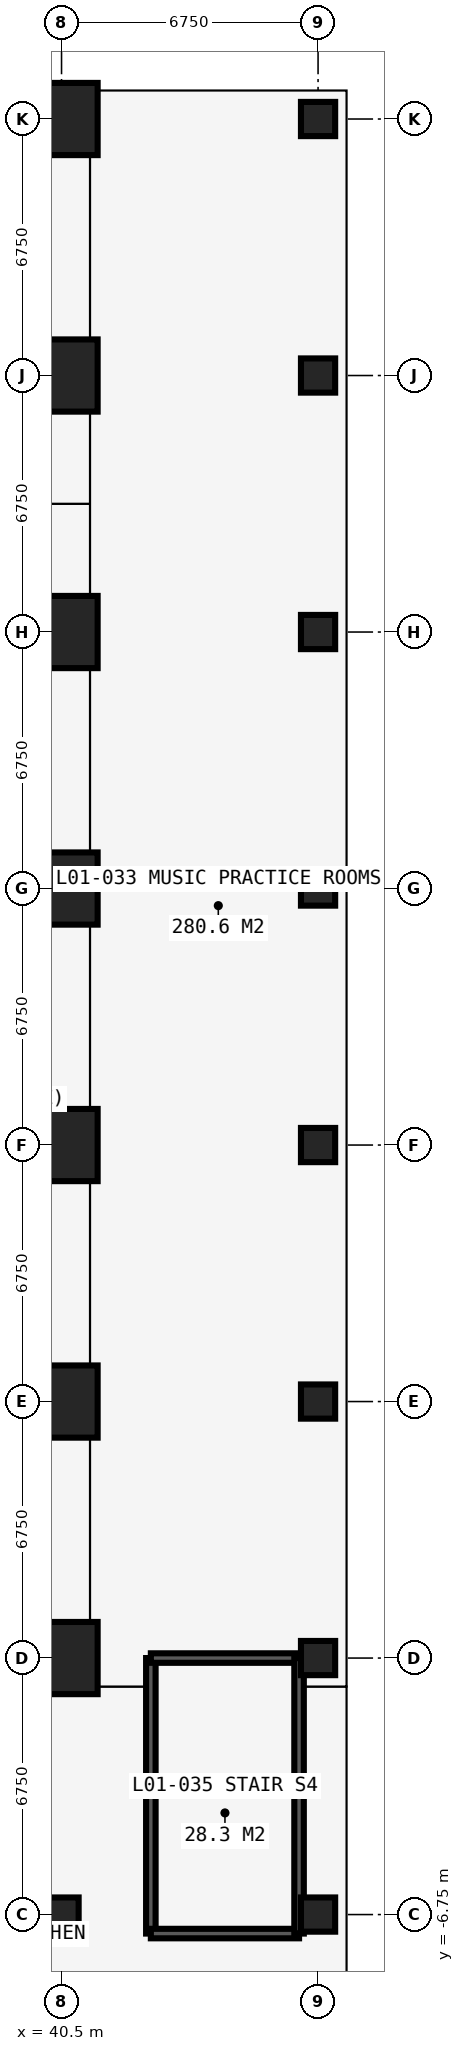
"""IFC4 building model, lengths in metres.
Left out: names, types, materials, properties, quantities, classifications, styles, units other than length and angle.
Written with IfcOpenShell. Run it as: python <this file> out.ifc"""

import sys

from ifc_helpers import new_model, si_unit, direction, frame, frame_2d, origin, origin_2d, place, context, subcontext, project, spatial, rectangle, circle, extrude, element, fill, save


model = new_model("IFC4")
c1 = context("Model", 3, precision=1e-05, world=origin(), true_north=direction((0.0, 1.0)))
c2 = subcontext(c1, "Body", "Model", "MODEL_VIEW")
j1 = project(units=[si_unit("LENGTHUNIT", "METRE"), si_unit("PLANEANGLEUNIT", "RADIAN")], contexts=[c1])
p1 = place(None, origin())
s1 = spatial("IfcSite", under=j1, at=p1, CompositionType="ELEMENT")
p2 = place(p1, origin())
s2 = spatial("IfcBuilding", under=s1, at=p2, CompositionType="ELEMENT")
p3 = place(p2, frame((0.0, 0.0, 4.5)))
s3 = spatial("IfcBuildingStorey", under=s2, at=p3, CompositionType="ELEMENT", Elevation=4.5)
p4 = place(p3, frame((40.5, -6.75, 0.0), z_axis=(0.0, 0.0, 1.0), x_axis=(1.0, 0.0, 0.0)))
e1 = element("IfcColumn", 1, at=p4, inside=s3, PredefinedType="COLUMN", context=c2, shape_type="SweptSolid", body=[
    extrude(circle(Radius=0.45, at=origin_2d()), origin(), (0.0, 0.0, 1.0), 4.5),
])
for number, where, z_axis, x_axis in (
    (2, (40.5, 0.0, 0.0), (0.0, 0.0, 1.0), (1.0, 0.0, 0.0)),
    (3, (40.5, 6.75, 0.0), (0.0, 0.0, 1.0), (1.0, 0.0, 0.0)),
    (4, (40.5, 13.5, 0.0), (0.0, 0.0, 1.0), (1.0, 0.0, 0.0)),
    (5, (40.5, 20.25, 0.0), (0.0, 0.0, 1.0), (1.0, 0.0, 0.0)),
    (6, (40.5, 27.0, 0.0), (0.0, 0.0, 1.0), (1.0, 0.0, 0.0)),
    (7, (40.5, 33.75, 0.0), (0.0, 0.0, 1.0), (1.0, 0.0, 0.0)),
    (8, (40.5, 40.5, 0.0), (0.0, 0.0, 1.0), (1.0, 0.0, 0.0)),
):
    element("IfcColumn", number, at=place(p3, frame(where, z_axis=z_axis, x_axis=x_axis)), inside=s3, PredefinedType="COLUMN", context=c2, shape_type="SweptSolid", body=[
        extrude(rectangle(XDim=1.9, YDim=1.9, at=origin_2d()), origin(), (0.0, 0.0, 1.0), 4.5),
    ])
for number, where, z_axis, x_axis in (
    (9, (47.25, -6.75, 0.0), (0.0, 0.0, 1.0), (1.0, 0.0, 0.0)),
    (10, (47.25, 0.0, 0.0), (0.0, 0.0, 1.0), (1.0, 0.0, 0.0)),
    (11, (47.25, 6.75, 0.0), (0.0, 0.0, 1.0), (1.0, 0.0, 0.0)),
    (12, (47.25, 13.5, 0.0), (0.0, 0.0, 1.0), (1.0, 0.0, 0.0)),
    (13, (47.25, 20.25, 0.0), (0.0, 0.0, 1.0), (1.0, 0.0, 0.0)),
    (14, (47.25, 27.0, 0.0), (0.0, 0.0, 1.0), (1.0, 0.0, 0.0)),
    (15, (47.25, 33.75, 0.0), (0.0, 0.0, 1.0), (1.0, 0.0, 0.0)),
    (16, (47.25, 40.5, 0.0), (0.0, 0.0, 1.0), (1.0, 0.0, 0.0)),
):
    element("IfcColumn", number, at=place(p3, frame(where, z_axis=z_axis, x_axis=x_axis)), inside=s3, PredefinedType="COLUMN", context=c2, shape_type="SweptSolid", body=[
        extrude(circle(Radius=0.45, at=origin_2d()), origin(), (0.0, 0.0, 1.0), 4.5),
    ])
p5 = place(p3, frame((-7.484, -0.75, 0.0), z_axis=(0.0, 0.0, 1.0), x_axis=(1.0, 0.0, 0.0)))
e17 = element("IfcWall", 17, at=p5, inside=s3, PredefinedType="PARTITIONING", context=c2, shape_type="SweptSolid", body=[
    extrude(rectangle(XDim=50.334, YDim=0.15, at=frame_2d((25.167, 0.0))), origin(), (0.0, 0.0, 1.0), 4.25),
])
p6 = place(p5, frame((18.384, 0.0, 0.0)))
e18 = element("IfcOpeningElement", 18, at=p6, cuts=e17, PredefinedType="OPENING", context=c2, shape_type="SweptSolid", body=[
    extrude(rectangle(XDim=1.6, YDim=2.4, at=frame_2d((0.8, 1.2))), frame((0.0, 0.085, 0.0), z_axis=(0.0, -1.0, 0.0), x_axis=(1.0, 0.0, 0.0)), (0.0, 0.0, 1.0), 0.17),
])
p7 = place(p5, frame((35.484, 0.0, 0.0)))
e19 = element("IfcOpeningElement", 19, at=p7, cuts=e17, PredefinedType="OPENING", context=c2, shape_type="SweptSolid", body=[
    extrude(rectangle(XDim=1.6, YDim=2.4, at=frame_2d((0.8, 1.2))), frame((0.0, 0.085, 0.0), z_axis=(0.0, -1.0, 0.0), x_axis=(1.0, 0.0, 0.0)), (0.0, 0.0, 1.0), 0.17),
])
p8 = place(p3, frame((30.375, 30.375, 0.0), z_axis=(0.0, 0.0, 1.0), x_axis=(1.0, 0.0, 0.0)))
e20 = element("IfcWall", 20, at=p8, inside=s3, PredefinedType="PARTITIONING", context=c2, shape_type="SweptSolid", body=[
    extrude(rectangle(XDim=10.875, YDim=0.15, at=frame_2d((5.438, 0.0))), origin(), (0.0, 0.0, 1.0), 4.25),
])
p9 = place(p3, frame((41.25, -0.75, 0.0), z_axis=(0.0, 0.0, 1.0), x_axis=(0.0, 1.0, 0.0)))
e21 = element("IfcWall", 21, at=p9, inside=s3, PredefinedType="PARTITIONING", context=c2, shape_type="SweptSolid", body=[
    extrude(rectangle(XDim=41.984, YDim=0.15, at=frame_2d((20.992, 0.0))), origin(), (0.0, 0.0, 1.0), 4.25),
])
p10 = place(p9, frame((15.2, 0.0, 0.0)))
e22 = element("IfcOpeningElement", 22, at=p10, cuts=e21, PredefinedType="OPENING", context=c2, shape_type="SweptSolid", body=[
    extrude(rectangle(XDim=1.6, YDim=2.4, at=frame_2d((0.8, 1.2))), frame((0.0, 0.085, 0.0), z_axis=(0.0, -1.0, 0.0), x_axis=(1.0, 0.0, 0.0)), (0.0, 0.0, 1.0), 0.17),
])
p11 = place(p3, frame((42.85, -7.25, 0.0), z_axis=(0.0, 0.0, 1.0), x_axis=(0.0, 1.0, 0.0)))
e23 = element("IfcWall", 23, at=p11, inside=s3, PredefinedType="SOLIDWALL", context=c2, shape_type="SweptSolid", body=[
    extrude(rectangle(XDim=7.25, YDim=0.25, at=frame_2d((3.625, 0.0))), origin(), (0.0, 0.0, 1.0), 4.25),
])
p12 = place(p3, frame((42.85, -7.25, 0.0), z_axis=(0.0, 0.0, 1.0), x_axis=(1.0, 0.0, 0.0)))
e24 = element("IfcWall", 24, at=p12, inside=s3, PredefinedType="SOLIDWALL", context=c2, shape_type="SweptSolid", body=[
    extrude(rectangle(XDim=3.9, YDim=0.25, at=frame_2d((1.95, 0.0))), origin(), (0.0, 0.0, 1.0), 4.25),
])
p13 = place(p12, frame((1.35, 0.0, 0.0)))
e25 = element("IfcOpeningElement", 25, at=p13, cuts=e24, PredefinedType="OPENING", context=c2, shape_type="SweptSolid", body=[
    extrude(rectangle(XDim=1.2, YDim=2.2, at=frame_2d((0.6, 1.1))), frame((0.0, 0.135, 0.0), z_axis=(0.0, -1.0, 0.0), x_axis=(1.0, 0.0, 0.0)), (0.0, 0.0, 1.0), 0.27),
])
p14 = place(p3, frame((42.85, 0.0, 0.0), z_axis=(0.0, 0.0, 1.0), x_axis=(1.0, 0.0, 0.0)))
e26 = element("IfcWall", 26, at=p14, inside=s3, PredefinedType="SOLIDWALL", context=c2, shape_type="SweptSolid", body=[
    extrude(rectangle(XDim=3.9, YDim=0.25, at=frame_2d((1.95, 0.0))), origin(), (0.0, 0.0, 1.0), 4.25),
])
p15 = place(p3, frame((46.75, -7.25, 0.0), z_axis=(0.0, 0.0, 1.0), x_axis=(0.0, 1.0, 0.0)))
e27 = element("IfcWall", 27, at=p15, inside=s3, PredefinedType="SOLIDWALL", context=c2, shape_type="SweptSolid", body=[
    extrude(rectangle(XDim=7.25, YDim=0.25, at=frame_2d((3.625, 0.0))), origin(), (0.0, 0.0, 1.0), 4.25),
])
p16 = place(p3, frame((46.75, -0.75, 0.0), z_axis=(0.0, 0.0, 1.0), x_axis=(1.0, 0.0, 0.0)))
e28 = element("IfcWall", 28, at=p16, inside=s3, PredefinedType="PARTITIONING", context=c2, shape_type="SweptSolid", body=[
    extrude(rectangle(XDim=1.234, YDim=0.15, at=frame_2d((0.617, 0.0))), origin(), (0.0, 0.0, 1.0), 4.25),
])
p17 = place(p10, origin())
e29 = element("IfcDoor", 29, at=p17, inside=s3, OperationType="DOUBLE_DOOR_SINGLE_SWING", PredefinedType="DOOR", context=c2, shape_type="SweptSolid", body=[
    extrude(rectangle(XDim=1.6, YDim=2.4, at=frame_2d((0.8, 1.2))), frame((0.0, 0.025, 0.0), z_axis=(0.0, -1.0, 0.0), x_axis=(1.0, 0.0, 0.0)), (0.0, 0.0, 1.0), 0.05),
])
fill(e22, e29)
p18 = place(p13, origin())
e30 = element("IfcDoor", 30, at=p18, inside=s3, OperationType="SINGLE_SWING_LEFT", PredefinedType="DOOR", context=c2, shape_type="SweptSolid", body=[
    extrude(rectangle(XDim=1.2, YDim=2.2, at=frame_2d((0.6, 1.1))), frame((0.0, 0.025, 0.0), z_axis=(0.0, -1.0, 0.0), x_axis=(1.0, 0.0, 0.0)), (0.0, 0.0, 1.0), 0.05),
])
fill(e25, e30)
save(model, sys.argv[1])
